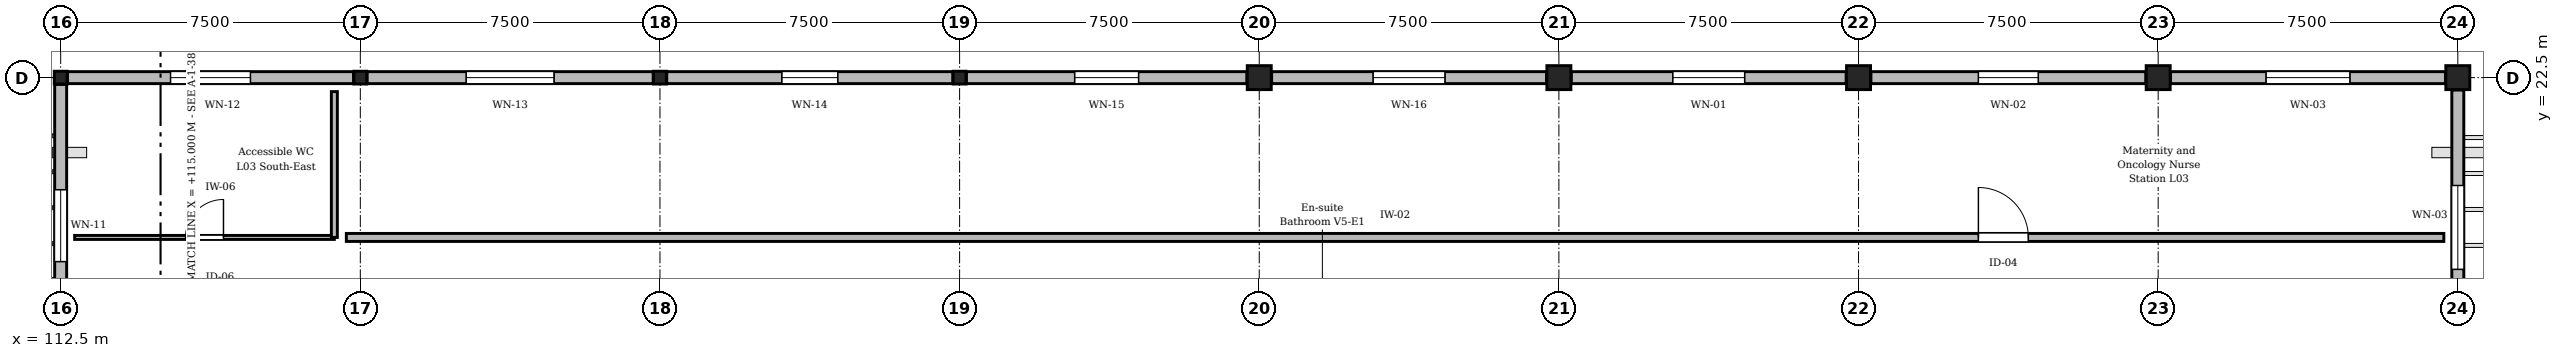
"""IFC4 building model, lengths in metres.
Left out: names, types, materials, properties, quantities, classifications, styles, units other than length and angle.
Written with IfcOpenShell. Run it as: python <this file> out.ifc"""

import sys

from ifc_helpers import new_model, si_unit, direction, frame, frame_2d, origin, origin_2d, place, context, subcontext, project, spatial, rectangle, circle, extrude, element, fill, save


model = new_model("IFC4")
c1 = context("Model", 3, precision=1e-05, world=origin(), true_north=direction((0.0, 1.0)))
c2 = subcontext(c1, "Body", "Model", "MODEL_VIEW")
j1 = project(units=[si_unit("LENGTHUNIT", "METRE"), si_unit("PLANEANGLEUNIT", "RADIAN")], contexts=[c1])
p1 = place(None, origin())
s1 = spatial("IfcSite", under=j1, at=p1, CompositionType="ELEMENT")
p2 = place(p1, origin())
s2 = spatial("IfcBuilding", under=s1, at=p2, CompositionType="ELEMENT")
p3 = place(p2, frame((0.0, 0.0, 14.1)))
s3 = spatial("IfcBuildingStorey", under=s2, at=p3, CompositionType="ELEMENT", Elevation=14.1)
for number, where, z_axis, x_axis in (
    (1, (112.5, 22.5, 0.0), (0.0, 0.0, 1.0), (1.0, 0.0, 0.0)),
    (2, (120.0, 22.5, 0.0), (0.0, 0.0, 1.0), (1.0, 0.0, 0.0)),
    (3, (127.5, 22.5, 0.0), (0.0, 0.0, 1.0), (1.0, 0.0, 0.0)),
    (4, (135.0, 22.5, 0.0), (0.0, 0.0, 1.0), (1.0, 0.0, 0.0)),
):
    element("IfcColumn", number, at=place(p3, frame(where, z_axis=z_axis, x_axis=x_axis)), inside=s3, PredefinedType="COLUMN", context=c2, shape_type="SweptSolid", body=[
        extrude(rectangle(XDim=0.32, YDim=0.32, at=origin_2d()), origin(), (0.0, 0.0, 1.0), 3.75),
    ])
for number, where, z_axis, x_axis in (
    (5, (142.5, 22.5, 0.0), (0.0, 0.0, 1.0), (1.0, 0.0, 0.0)),
    (6, (150.0, 22.5, 0.0), (0.0, 0.0, 1.0), (1.0, 0.0, 0.0)),
):
    element("IfcColumn", number, at=place(p3, frame(where, z_axis=z_axis, x_axis=x_axis)), inside=s3, PredefinedType="COLUMN", context=c2, shape_type="SweptSolid", body=[
        extrude(rectangle(XDim=0.6, YDim=0.6, at=origin_2d()), origin(), (0.0, 0.0, 1.0), 3.75),
    ])
p4 = place(p3, frame((157.5, 22.5, 0.0), z_axis=(0.0, 0.0, 1.0), x_axis=(1.0, 0.0, 0.0)))
e7 = element("IfcColumn", 7, at=p4, inside=s3, PredefinedType="COLUMN", context=c2, shape_type="SweptSolid", body=[
    extrude(circle(Radius=0.3, at=origin_2d()), origin(), (0.0, 0.0, 1.0), 3.75),
])
for number, where, z_axis, x_axis in (
    (8, (165.0, 22.5, 0.0), (0.0, 0.0, 1.0), (1.0, 0.0, 0.0)),
    (9, (172.5, 22.5, 0.0), (0.0, 0.0, 1.0), (1.0, 0.0, 0.0)),
):
    element("IfcColumn", number, at=place(p3, frame(where, z_axis=z_axis, x_axis=x_axis)), inside=s3, PredefinedType="COLUMN", context=c2, shape_type="SweptSolid", body=[
        extrude(rectangle(XDim=0.6, YDim=0.6, at=origin_2d()), origin(), (0.0, 0.0, 1.0), 3.75),
    ])
p5 = place(p3, frame((112.67, 22.5, 0.0), z_axis=(0.0, 0.0, 1.0), x_axis=(1.0, 0.0, 0.0)))
e10 = element("IfcWall", 10, at=p5, inside=s3, PredefinedType="STANDARD", context=c2, shape_type="SweptSolid", body=[
    extrude(rectangle(XDim=7.16, YDim=0.3, at=frame_2d((3.58, 0.0))), origin(), (0.0, 0.0, 1.0), 2.87),
])
p6 = place(p5, frame((2.58, 0.0, 0.9)))
e11 = element("IfcOpeningElement", 11, at=p6, cuts=e10, PredefinedType="OPENING", context=c2, shape_type="SweptSolid", body=[
    extrude(rectangle(XDim=2.0, YDim=1.69, at=frame_2d((1.0, 0.845))), frame((0.0, 0.16, 0.0), z_axis=(0.0, -1.0, 0.0), x_axis=(1.0, 0.0, 0.0)), (0.0, 0.0, 1.0), 0.32),
])
p7 = place(p3, frame((112.5, 15.26, 0.0), z_axis=(0.0, 0.0, 1.0), x_axis=(0.0, 1.0, 0.0)))
e12 = element("IfcWall", 12, at=p7, inside=s3, PredefinedType="STANDARD", context=c2, shape_type="SweptSolid", body=[
    extrude(rectangle(XDim=7.07, YDim=0.3, at=frame_2d((3.535, 0.0))), origin(), (0.0, 0.0, 1.0), 2.87),
])
p8 = place(p7, frame((2.635, 0.0, 0.9)))
e13 = element("IfcOpeningElement", 13, at=p8, cuts=e12, PredefinedType="OPENING", context=c2, shape_type="SweptSolid", body=[
    extrude(rectangle(XDim=1.8, YDim=1.69, at=frame_2d((0.9, 0.845))), frame((0.0, 0.16, 0.0), z_axis=(0.0, -1.0, 0.0), x_axis=(1.0, 0.0, 0.0)), (0.0, 0.0, 1.0), 0.32),
])
p9 = place(p3, frame((120.17, 22.5, 0.0), z_axis=(0.0, 0.0, 1.0), x_axis=(1.0, 0.0, 0.0)))
e14 = element("IfcWall", 14, at=p9, inside=s3, PredefinedType="STANDARD", context=c2, shape_type="SweptSolid", body=[
    extrude(rectangle(XDim=7.16, YDim=0.3, at=frame_2d((3.58, 0.0))), origin(), (0.0, 0.0, 1.0), 2.87),
])
p10 = place(p9, frame((2.48, 0.0, 0.9)))
e15 = element("IfcOpeningElement", 15, at=p10, cuts=e14, PredefinedType="OPENING", context=c2, shape_type="SweptSolid", body=[
    extrude(rectangle(XDim=2.2, YDim=1.69, at=frame_2d((1.1, 0.845))), frame((0.0, 0.16, 0.0), z_axis=(0.0, -1.0, 0.0), x_axis=(1.0, 0.0, 0.0)), (0.0, 0.0, 1.0), 0.32),
])
p11 = place(p3, frame((127.67, 22.5, 0.0), z_axis=(0.0, 0.0, 1.0), x_axis=(1.0, 0.0, 0.0)))
e16 = element("IfcWall", 16, at=p11, inside=s3, PredefinedType="STANDARD", context=c2, shape_type="SweptSolid", body=[
    extrude(rectangle(XDim=7.16, YDim=0.3, at=frame_2d((3.58, 0.0))), origin(), (0.0, 0.0, 1.0), 2.87),
])
p12 = place(p11, frame((2.88, 0.0, 0.9)))
e17 = element("IfcOpeningElement", 17, at=p12, cuts=e16, PredefinedType="OPENING", context=c2, shape_type="SweptSolid", body=[
    extrude(rectangle(XDim=1.4, YDim=1.69, at=frame_2d((0.7, 0.845))), frame((0.0, 0.16, 0.0), z_axis=(0.0, -1.0, 0.0), x_axis=(1.0, 0.0, 0.0)), (0.0, 0.0, 1.0), 0.32),
])
p13 = place(p3, frame((135.17, 22.5, 0.0), z_axis=(0.0, 0.0, 1.0), x_axis=(1.0, 0.0, 0.0)))
e18 = element("IfcWall", 18, at=p13, inside=s3, PredefinedType="STANDARD", context=c2, shape_type="SweptSolid", body=[
    extrude(rectangle(XDim=7.02, YDim=0.3, at=frame_2d((3.51, 0.0))), origin(), (0.0, 0.0, 1.0), 2.87),
])
p14 = place(p13, frame((2.71, 0.0, 0.9)))
e19 = element("IfcOpeningElement", 19, at=p14, cuts=e18, PredefinedType="OPENING", context=c2, shape_type="SweptSolid", body=[
    extrude(rectangle(XDim=1.6, YDim=1.69, at=frame_2d((0.8, 0.845))), frame((0.0, 0.16, 0.0), z_axis=(0.0, -1.0, 0.0), x_axis=(1.0, 0.0, 0.0)), (0.0, 0.0, 1.0), 0.32),
])
p15 = place(p3, frame((142.81, 22.5, 0.0), z_axis=(0.0, 0.0, 1.0), x_axis=(1.0, 0.0, 0.0)))
e20 = element("IfcWall", 20, at=p15, inside=s3, PredefinedType="STANDARD", context=c2, shape_type="SweptSolid", body=[
    extrude(rectangle(XDim=6.88, YDim=0.3, at=frame_2d((3.44, 0.0))), origin(), (0.0, 0.0, 1.0), 2.87),
])
p16 = place(p15, frame((2.54, 0.0, 0.9)))
e21 = element("IfcOpeningElement", 21, at=p16, cuts=e20, PredefinedType="OPENING", context=c2, shape_type="SweptSolid", body=[
    extrude(rectangle(XDim=1.8, YDim=1.69, at=frame_2d((0.9, 0.845))), frame((0.0, 0.16, 0.0), z_axis=(0.0, -1.0, 0.0), x_axis=(1.0, 0.0, 0.0)), (0.0, 0.0, 1.0), 0.32),
])
p17 = place(p3, frame((150.31, 22.5, 0.0), z_axis=(0.0, 0.0, 1.0), x_axis=(1.0, 0.0, 0.0)))
e22 = element("IfcWall", 22, at=p17, inside=s3, PredefinedType="STANDARD", context=c2, shape_type="SweptSolid", body=[
    extrude(rectangle(XDim=6.88, YDim=0.3, at=frame_2d((3.44, 0.0))), origin(), (0.0, 0.0, 1.0), 2.87),
])
p18 = place(p17, frame((2.54, 0.0, 0.9)))
e23 = element("IfcOpeningElement", 23, at=p18, cuts=e22, PredefinedType="OPENING", context=c2, shape_type="SweptSolid", body=[
    extrude(rectangle(XDim=1.8, YDim=1.69, at=frame_2d((0.9, 0.845))), frame((0.0, 0.16, 0.0), z_axis=(0.0, -1.0, 0.0), x_axis=(1.0, 0.0, 0.0)), (0.0, 0.0, 1.0), 0.32),
])
p19 = place(p3, frame((157.81, 22.5, 0.0), z_axis=(0.0, 0.0, 1.0), x_axis=(1.0, 0.0, 0.0)))
e24 = element("IfcWall", 24, at=p19, inside=s3, PredefinedType="STANDARD", context=c2, shape_type="SweptSolid", body=[
    extrude(rectangle(XDim=6.88, YDim=0.3, at=frame_2d((3.44, 0.0))), origin(), (0.0, 0.0, 1.0), 2.87),
])
p20 = place(p19, frame((2.69, 0.0, 0.9)))
e25 = element("IfcOpeningElement", 25, at=p20, cuts=e24, PredefinedType="OPENING", context=c2, shape_type="SweptSolid", body=[
    extrude(rectangle(XDim=1.5, YDim=1.69, at=frame_2d((0.75, 0.845))), frame((0.0, 0.16, 0.0), z_axis=(0.0, -1.0, 0.0), x_axis=(1.0, 0.0, 0.0)), (0.0, 0.0, 1.0), 0.32),
])
p21 = place(p3, frame((165.31, 22.5, 0.0), z_axis=(0.0, 0.0, 1.0), x_axis=(1.0, 0.0, 0.0)))
e26 = element("IfcWall", 26, at=p21, inside=s3, PredefinedType="STANDARD", context=c2, shape_type="SweptSolid", body=[
    extrude(rectangle(XDim=6.88, YDim=0.3, at=frame_2d((3.44, 0.0))), origin(), (0.0, 0.0, 1.0), 2.87),
])
p22 = place(p21, frame((2.39, 0.0, 0.9)))
e27 = element("IfcOpeningElement", 27, at=p22, cuts=e26, PredefinedType="OPENING", context=c2, shape_type="SweptSolid", body=[
    extrude(rectangle(XDim=2.1, YDim=1.69, at=frame_2d((1.05, 0.845))), frame((0.0, 0.16, 0.0), z_axis=(0.0, -1.0, 0.0), x_axis=(1.0, 0.0, 0.0)), (0.0, 0.0, 1.0), 0.32),
])
p23 = place(p3, frame((172.5, 22.19, 0.0), z_axis=(0.0, 0.0, 1.0), x_axis=(0.0, -1.0, 0.0)))
e28 = element("IfcWall", 28, at=p23, inside=s3, PredefinedType="STANDARD", context=c2, shape_type="SweptSolid", body=[
    extrude(rectangle(XDim=6.88, YDim=0.3, at=frame_2d((3.44, 0.0))), origin(), (0.0, 0.0, 1.0), 2.87),
])
p24 = place(p23, frame((2.39, 0.0, 0.9)))
e29 = element("IfcOpeningElement", 29, at=p24, cuts=e28, PredefinedType="OPENING", context=c2, shape_type="SweptSolid", body=[
    extrude(rectangle(XDim=2.1, YDim=1.69, at=frame_2d((1.05, 0.845))), frame((0.0, 0.16, 0.0), z_axis=(0.0, -1.0, 0.0), x_axis=(1.0, 0.0, 0.0)), (0.0, 0.0, 1.0), 0.32),
])
p25 = place(p3, frame((112.85, 18.5, 0.0), z_axis=(0.0, 0.0, 1.0), x_axis=(1.0, 0.0, 0.0)))
e30 = element("IfcWall", 30, at=p25, inside=s3, PredefinedType="PARTITIONING", context=c2, shape_type="SweptSolid", body=[
    extrude(rectangle(XDim=6.5, YDim=0.1, at=frame_2d((3.25, 0.0))), origin(), (0.0, 0.0, 1.0), 3.455),
])
p26 = place(p25, frame((2.775, 0.0, 0.0)))
e31 = element("IfcOpeningElement", 31, at=p26, cuts=e30, PredefinedType="OPENING", context=c2, shape_type="SweptSolid", body=[
    extrude(rectangle(XDim=0.95, YDim=2.15, at=frame_2d((0.475, 1.075))), frame((0.0, 0.06, 0.0), z_axis=(0.0, -1.0, 0.0), x_axis=(1.0, 0.0, 0.0)), (0.0, 0.0, 1.0), 0.12),
])
p27 = place(p3, frame((119.65, 18.5, 0.0), z_axis=(0.0, 0.0, 1.0), x_axis=(1.0, 0.0, 0.0)))
e32 = element("IfcWall", 32, at=p27, inside=s3, PredefinedType="STANDARD", context=c2, shape_type="SweptSolid", body=[
    extrude(rectangle(XDim=52.5, YDim=0.2, at=frame_2d((26.25, 0.0))), origin(), (0.0, 0.0, 1.0), 3.455),
])
p28 = place(p27, frame((40.85, 0.0, 0.0)))
e33 = element("IfcOpeningElement", 33, at=p28, cuts=e32, PredefinedType="OPENING", context=c2, shape_type="SweptSolid", body=[
    extrude(rectangle(XDim=1.25, YDim=2.2, at=frame_2d((0.625, 1.1))), frame((0.0, 0.11, 0.0), z_axis=(0.0, -1.0, 0.0), x_axis=(1.0, 0.0, 0.0)), (0.0, 0.0, 1.0), 0.22),
])
p29 = place(p3, frame((119.35, 18.5, 0.0), z_axis=(0.0, 0.0, 1.0), x_axis=(0.0, 1.0, 0.0)))
e34 = element("IfcWall", 34, at=p29, inside=s3, PredefinedType="PARTITIONING", context=c2, shape_type="SweptSolid", body=[
    extrude(rectangle(XDim=3.65, YDim=0.15, at=frame_2d((1.825, 0.0))), origin(), (0.0, 0.0, 1.0), 3.455),
])
p30 = place(p6, origin())
e35 = element("IfcWindow", 35, at=p30, inside=s3, PartitioningType="SINGLE_PANEL", PredefinedType="WINDOW", context=c2, shape_type="SweptSolid", body=[
    extrude(rectangle(XDim=2.0, YDim=1.69, at=frame_2d((1.0, 0.845))), frame((0.0, 0.03, 0.0), z_axis=(0.0, -1.0, 0.0), x_axis=(1.0, 0.0, 0.0)), (0.0, 0.0, 1.0), 0.06),
])
fill(e11, e35)
p31 = place(p8, origin())
e36 = element("IfcWindow", 36, at=p31, inside=s3, PartitioningType="SINGLE_PANEL", PredefinedType="WINDOW", context=c2, shape_type="SweptSolid", body=[
    extrude(rectangle(XDim=1.8, YDim=1.69, at=frame_2d((0.9, 0.845))), frame((0.0, 0.03, 0.0), z_axis=(0.0, -1.0, 0.0), x_axis=(1.0, 0.0, 0.0)), (0.0, 0.0, 1.0), 0.06),
])
fill(e13, e36)
p32 = place(p10, origin())
e37 = element("IfcWindow", 37, at=p32, inside=s3, PartitioningType="SINGLE_PANEL", PredefinedType="WINDOW", context=c2, shape_type="SweptSolid", body=[
    extrude(rectangle(XDim=2.2, YDim=1.69, at=frame_2d((1.1, 0.845))), frame((0.0, 0.03, 0.0), z_axis=(0.0, -1.0, 0.0), x_axis=(1.0, 0.0, 0.0)), (0.0, 0.0, 1.0), 0.06),
])
fill(e15, e37)
p33 = place(p12, origin())
e38 = element("IfcWindow", 38, at=p33, inside=s3, PartitioningType="SINGLE_PANEL", PredefinedType="WINDOW", context=c2, shape_type="SweptSolid", body=[
    extrude(rectangle(XDim=1.4, YDim=1.69, at=frame_2d((0.7, 0.845))), frame((0.0, 0.03, 0.0), z_axis=(0.0, -1.0, 0.0), x_axis=(1.0, 0.0, 0.0)), (0.0, 0.0, 1.0), 0.06),
])
fill(e17, e38)
p34 = place(p14, origin())
e39 = element("IfcWindow", 39, at=p34, inside=s3, PartitioningType="SINGLE_PANEL", PredefinedType="WINDOW", context=c2, shape_type="SweptSolid", body=[
    extrude(rectangle(XDim=1.6, YDim=1.69, at=frame_2d((0.8, 0.845))), frame((0.0, 0.03, 0.0), z_axis=(0.0, -1.0, 0.0), x_axis=(1.0, 0.0, 0.0)), (0.0, 0.0, 1.0), 0.06),
])
fill(e19, e39)
p35 = place(p16, origin())
e40 = element("IfcWindow", 40, at=p35, inside=s3, PartitioningType="SINGLE_PANEL", PredefinedType="WINDOW", context=c2, shape_type="SweptSolid", body=[
    extrude(rectangle(XDim=1.8, YDim=1.69, at=frame_2d((0.9, 0.845))), frame((0.0, 0.03, 0.0), z_axis=(0.0, -1.0, 0.0), x_axis=(1.0, 0.0, 0.0)), (0.0, 0.0, 1.0), 0.06),
])
fill(e21, e40)
p36 = place(p18, origin())
e41 = element("IfcWindow", 41, at=p36, inside=s3, PartitioningType="SINGLE_PANEL", PredefinedType="WINDOW", context=c2, shape_type="SweptSolid", body=[
    extrude(rectangle(XDim=1.8, YDim=1.69, at=frame_2d((0.9, 0.845))), frame((0.0, 0.03, 0.0), z_axis=(0.0, -1.0, 0.0), x_axis=(1.0, 0.0, 0.0)), (0.0, 0.0, 1.0), 0.06),
])
fill(e23, e41)
p37 = place(p20, origin())
e42 = element("IfcWindow", 42, at=p37, inside=s3, PartitioningType="SINGLE_PANEL", PredefinedType="WINDOW", context=c2, shape_type="SweptSolid", body=[
    extrude(rectangle(XDim=1.5, YDim=1.69, at=frame_2d((0.75, 0.845))), frame((0.0, 0.03, 0.0), z_axis=(0.0, -1.0, 0.0), x_axis=(1.0, 0.0, 0.0)), (0.0, 0.0, 1.0), 0.06),
])
fill(e25, e42)
p38 = place(p22, origin())
e43 = element("IfcWindow", 43, at=p38, inside=s3, PartitioningType="SINGLE_PANEL", PredefinedType="WINDOW", context=c2, shape_type="SweptSolid", body=[
    extrude(rectangle(XDim=2.1, YDim=1.69, at=frame_2d((1.05, 0.845))), frame((0.0, 0.03, 0.0), z_axis=(0.0, -1.0, 0.0), x_axis=(1.0, 0.0, 0.0)), (0.0, 0.0, 1.0), 0.06),
])
fill(e27, e43)
p39 = place(p24, origin())
e44 = element("IfcWindow", 44, at=p39, inside=s3, PartitioningType="SINGLE_PANEL", PredefinedType="WINDOW", context=c2, shape_type="SweptSolid", body=[
    extrude(rectangle(XDim=2.1, YDim=1.69, at=frame_2d((1.05, 0.845))), frame((0.0, 0.03, 0.0), z_axis=(0.0, -1.0, 0.0), x_axis=(1.0, 0.0, 0.0)), (0.0, 0.0, 1.0), 0.06),
])
fill(e29, e44)
p40 = place(p26, origin())
e45 = element("IfcDoor", 45, at=p40, inside=s3, OperationType="SINGLE_SWING_RIGHT", PredefinedType="DOOR", context=c2, shape_type="SweptSolid", body=[
    extrude(rectangle(XDim=0.95, YDim=2.15, at=frame_2d((0.475, 1.075))), frame((0.0, 0.025, 0.0), z_axis=(0.0, -1.0, 0.0), x_axis=(1.0, 0.0, 0.0)), (0.0, 0.0, 1.0), 0.05),
])
fill(e31, e45)
p41 = place(p28, origin())
e46 = element("IfcDoor", 46, at=p41, inside=s3, OperationType="SINGLE_SWING_LEFT", PredefinedType="DOOR", context=c2, shape_type="SweptSolid", body=[
    extrude(rectangle(XDim=1.25, YDim=2.2, at=frame_2d((0.625, 1.1))), frame((0.0, 0.025, 0.0), z_axis=(0.0, -1.0, 0.0), x_axis=(1.0, 0.0, 0.0)), (0.0, 0.0, 1.0), 0.05),
])
fill(e33, e46)
save(model, sys.argv[1])
